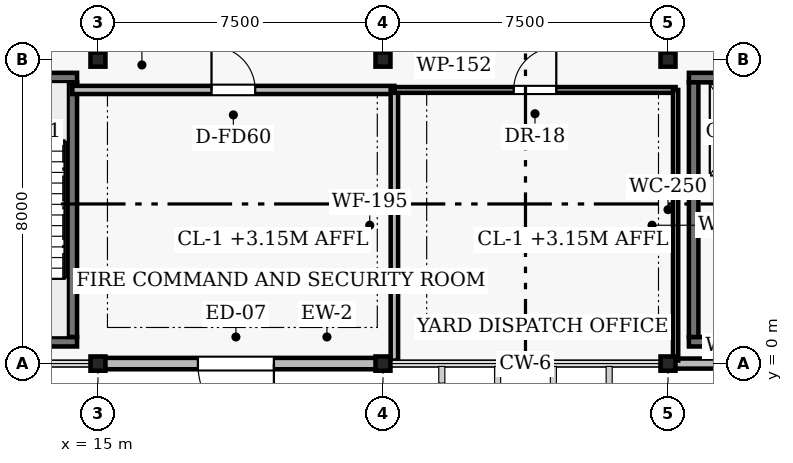
"""IFC4 building model, lengths in metres.
Left out: names, types, materials, properties, quantities, classifications, styles, units other than length and angle.
Written with IfcOpenShell. Run it as: python <this file> out.ifc"""

import sys

from ifc_helpers import new_model, si_unit, direction, frame, frame_2d, origin, origin_2d, place, context, subcontext, project, spatial, rectangle, i_section, extrude, element, fill, save


model = new_model("IFC4")
c1 = context("Model", 3, precision=1e-05, world=origin(), true_north=direction((0.0, 1.0)))
c2 = subcontext(c1, "Body", "Model", "MODEL_VIEW")
j1 = project(units=[si_unit("LENGTHUNIT", "METRE"), si_unit("PLANEANGLEUNIT", "RADIAN")], contexts=[c1])
p1 = place(None, origin())
s1 = spatial("IfcSite", under=j1, at=p1, CompositionType="ELEMENT")
p2 = place(p1, origin())
s2 = spatial("IfcBuilding", under=s1, at=p2, CompositionType="ELEMENT")
p3 = place(p2, origin())
s3 = spatial("IfcBuildingStorey", under=s2, at=p3, CompositionType="ELEMENT", Elevation=0.0)
for number, where, z_axis, x_axis in (
    (1, (15.0, 0.0, 0.0), (0.0, 0.0, 1.0), (1.0, 0.0, 0.0)),
    (2, (15.0, 8.0, 0.0), (0.0, 0.0, 1.0), (1.0, 0.0, 0.0)),
    (3, (22.5, 0.0, 0.0), (0.0, 0.0, 1.0), (1.0, 0.0, 0.0)),
    (4, (22.5, 8.0, 0.0), (0.0, 0.0, 1.0), (1.0, 0.0, 0.0)),
    (5, (30.0, 0.0, 0.0), (0.0, 0.0, 1.0), (1.0, 0.0, 0.0)),
    (6, (30.0, 8.0, 0.0), (0.0, 0.0, 1.0), (1.0, 0.0, 0.0)),
):
    element("IfcColumn", number, at=place(p3, frame(where, z_axis=z_axis, x_axis=x_axis)), inside=s3, PredefinedType="COLUMN", context=c2, shape_type="SweptSolid", body=[
        extrude(i_section(OverallWidth=0.394, OverallDepth=0.375, WebThickness=0.021, FlangeThickness=0.033, FilletRadius=0.018, at=origin_2d()), origin(), (0.0, 0.0, 1.0), 4.5),
    ])
p4 = place(p3, frame((15.08, 0.0, 0.0), z_axis=(0.0, 0.0, 1.0), x_axis=(1.0, 0.0, 0.0)))
e7 = element("IfcWall", 7, at=p4, inside=s3, PredefinedType="SOLIDWALL", context=c2, shape_type="SweptSolid", body=[
    extrude(rectangle(XDim=7.34, YDim=0.3, at=frame_2d((3.67, 0.0))), origin(), (0.0, 0.0, 1.0), 3.75),
])
p5 = place(p4, frame((2.55, 0.0, 0.0)))
e8 = element("IfcOpeningElement", 8, at=p5, cuts=e7, PredefinedType="OPENING", context=c2, shape_type="SweptSolid", body=[
    extrude(rectangle(XDim=2.0, YDim=2.2, at=frame_2d((1.0, 1.1))), frame((0.0, 0.16, 0.0), z_axis=(0.0, -1.0, 0.0), x_axis=(1.0, 0.0, 0.0)), (0.0, 0.0, 1.0), 0.32),
])
p6 = place(p3, frame((30.08, 0.0, 0.0), z_axis=(0.0, 0.0, 1.0), x_axis=(1.0, 0.0, 0.0)))
e9 = element("IfcWall", 9, at=p6, inside=s3, PredefinedType="SOLIDWALL", context=c2, shape_type="SweptSolid", body=[
    extrude(rectangle(XDim=7.34, YDim=0.265, at=frame_2d((3.67, 0.0))), origin(), (0.0, 0.0, 1.0), 3.85),
])
p7 = place(p6, frame((1.2, 0.0, 1.05)))
e10 = element("IfcOpeningElement", 10, at=p7, cuts=e9, PredefinedType="OPENING", context=c2, shape_type="SweptSolid", body=[
    extrude(rectangle(XDim=1.2, YDim=1.5, at=frame_2d((0.6, 0.75))), frame((0.0, 0.142, 0.0), z_axis=(0.0, -1.0, 0.0), x_axis=(1.0, 0.0, 0.0)), (0.0, 0.0, 1.0), 0.285),
])
p8 = place(p6, frame((4.1, 0.0, 1.05)))
e11 = element("IfcOpeningElement", 11, at=p8, cuts=e9, PredefinedType="OPENING", context=c2, shape_type="SweptSolid", body=[
    extrude(rectangle(XDim=1.2, YDim=1.65, at=frame_2d((0.6, 0.825))), frame((0.0, 0.142, 0.0), z_axis=(0.0, -1.0, 0.0), x_axis=(1.0, 0.0, 0.0)), (0.0, 0.0, 1.0), 0.285),
])
p9 = place(p3, frame((8.05, 0.575, 0.0), z_axis=(0.0, 0.0, 1.0), x_axis=(1.0, 0.0, 0.0)))
e12 = element("IfcWall", 12, at=p9, inside=s3, PredefinedType="SHEAR", context=c2, shape_type="SweptSolid", body=[
    extrude(rectangle(XDim=6.4, YDim=0.25, at=frame_2d((3.2, 0.0))), origin(), (0.0, 0.0, 1.0), 4.5),
])
p10 = place(p3, frame((8.05, 7.525, 0.0), z_axis=(0.0, 0.0, 1.0), x_axis=(1.0, 0.0, 0.0)))
e13 = element("IfcWall", 13, at=p10, inside=s3, PredefinedType="SHEAR", context=c2, shape_type="SweptSolid", body=[
    extrude(rectangle(XDim=6.4, YDim=0.25, at=frame_2d((3.2, 0.0))), origin(), (0.0, 0.0, 1.0), 4.5),
])
p11 = place(p10, frame((0.8, 0.0, 0.0)))
e14 = element("IfcOpeningElement", 14, at=p11, cuts=e13, PredefinedType="OPENING", context=c2, shape_type="SweptSolid", body=[
    extrude(rectangle(XDim=1.1, YDim=2.15, at=frame_2d((0.55, 1.075))), frame((0.0, 0.135, 0.0), z_axis=(0.0, -1.0, 0.0), x_axis=(1.0, 0.0, 0.0)), (0.0, 0.0, 1.0), 0.27),
])
p12 = place(p10, frame((3.775, 0.0, 0.0)))
e15 = element("IfcOpeningElement", 15, at=p12, cuts=e13, PredefinedType="OPENING", context=c2, shape_type="SweptSolid", body=[
    extrude(rectangle(XDim=1.25, YDim=2.15, at=frame_2d((0.625, 1.075))), frame((0.0, 0.135, 0.0), z_axis=(0.0, -1.0, 0.0), x_axis=(1.0, 0.0, 0.0)), (0.0, 0.0, 1.0), 0.27),
])
p13 = place(p3, frame((14.325, 0.7, 0.0), z_axis=(0.0, 0.0, 1.0), x_axis=(0.0, 1.0, 0.0)))
e16 = element("IfcWall", 16, at=p13, inside=s3, PredefinedType="SHEAR", context=c2, shape_type="SweptSolid", body=[
    extrude(rectangle(XDim=6.7, YDim=0.25, at=frame_2d((3.35, 0.0))), origin(), (0.0, 0.0, 1.0), 4.5),
])
p14 = place(p3, frame((30.55, 0.575, 0.0), z_axis=(0.0, 0.0, 1.0), x_axis=(1.0, 0.0, 0.0)))
e17 = element("IfcWall", 17, at=p14, inside=s3, PredefinedType="SHEAR", context=c2, shape_type="SweptSolid", body=[
    extrude(rectangle(XDim=6.4, YDim=0.25, at=frame_2d((3.2, 0.0))), origin(), (0.0, 0.0, 1.0), 4.5),
])
p15 = place(p3, frame((30.55, 7.525, 0.0), z_axis=(0.0, 0.0, 1.0), x_axis=(1.0, 0.0, 0.0)))
e18 = element("IfcWall", 18, at=p15, inside=s3, PredefinedType="SHEAR", context=c2, shape_type="SweptSolid", body=[
    extrude(rectangle(XDim=6.4, YDim=0.25, at=frame_2d((3.2, 0.0))), origin(), (0.0, 0.0, 1.0), 4.5),
])
p16 = place(p15, frame((0.8, 0.0, 0.0)))
e19 = element("IfcOpeningElement", 19, at=p16, cuts=e18, PredefinedType="OPENING", context=c2, shape_type="SweptSolid", body=[
    extrude(rectangle(XDim=1.1, YDim=2.15, at=frame_2d((0.55, 1.075))), frame((0.0, 0.135, 0.0), z_axis=(0.0, -1.0, 0.0), x_axis=(1.0, 0.0, 0.0)), (0.0, 0.0, 1.0), 0.27),
])
p17 = place(p15, frame((3.775, 0.0, 0.0)))
e20 = element("IfcOpeningElement", 20, at=p17, cuts=e18, PredefinedType="OPENING", context=c2, shape_type="SweptSolid", body=[
    extrude(rectangle(XDim=1.25, YDim=2.15, at=frame_2d((0.625, 1.075))), frame((0.0, 0.135, 0.0), z_axis=(0.0, -1.0, 0.0), x_axis=(1.0, 0.0, 0.0)), (0.0, 0.0, 1.0), 0.27),
])
p18 = place(p3, frame((30.675, 0.7, 0.0), z_axis=(0.0, 0.0, 1.0), x_axis=(0.0, 1.0, 0.0)))
e21 = element("IfcWall", 21, at=p18, inside=s3, PredefinedType="SHEAR", context=c2, shape_type="SweptSolid", body=[
    extrude(rectangle(XDim=6.7, YDim=0.25, at=frame_2d((3.35, 0.0))), origin(), (0.0, 0.0, 1.0), 4.5),
])
p19 = place(p3, frame((14.325, 7.2, 0.0), z_axis=(0.0, 0.0, 1.0), x_axis=(1.0, 0.0, 0.0)))
e22 = element("IfcWall", 22, at=p19, inside=s3, PredefinedType="PARTITIONING", context=c2, shape_type="SweptSolid", body=[
    extrude(rectangle(XDim=8.475, YDim=0.215, at=frame_2d((4.238, 0.0))), origin(), (0.0, 0.0, 1.0), 3.7),
])
p20 = place(p19, frame((3.663, 0.0, 0.0)))
e23 = element("IfcOpeningElement", 23, at=p20, cuts=e22, PredefinedType="OPENING", context=c2, shape_type="SweptSolid", body=[
    extrude(rectangle(XDim=1.15, YDim=2.15, at=frame_2d((0.575, 1.075))), frame((0.0, 0.117, 0.0), z_axis=(0.0, -1.0, 0.0), x_axis=(1.0, 0.0, 0.0)), (0.0, 0.0, 1.0), 0.235),
])
p21 = place(p3, frame((22.8, 0.08, 0.0), z_axis=(0.0, 0.0, 1.0), x_axis=(0.0, 1.0, 0.0)))
e24 = element("IfcWall", 24, at=p21, inside=s3, PredefinedType="PARTITIONING", context=c2, shape_type="SweptSolid", body=[
    extrude(rectangle(XDim=7.12, YDim=0.195, at=frame_2d((3.56, 0.0))), origin(), (0.0, 0.0, 1.0), 3.7),
])
p22 = place(p3, frame((22.8, 7.2, 0.0), z_axis=(0.0, 0.0, 1.0), x_axis=(1.0, 0.0, 0.0)))
e25 = element("IfcWall", 25, at=p22, inside=s3, PredefinedType="PARTITIONING", context=c2, shape_type="SweptSolid", body=[
    extrude(rectangle(XDim=7.4, YDim=0.152, at=frame_2d((3.7, 0.0))), origin(), (0.0, 0.0, 1.0), 3.7),
])
p23 = place(p22, frame((3.14, 0.0, 0.0)))
e26 = element("IfcOpeningElement", 26, at=p23, cuts=e25, PredefinedType="OPENING", context=c2, shape_type="SweptSolid", body=[
    extrude(rectangle(XDim=1.12, YDim=2.14, at=frame_2d((0.56, 1.07))), frame((0.0, 0.086, 0.0), z_axis=(0.0, -1.0, 0.0), x_axis=(1.0, 0.0, 0.0)), (0.0, 0.0, 1.0), 0.172),
])
p24 = place(p3, frame((30.2, 0.08, 0.0), z_axis=(0.0, 0.0, 1.0), x_axis=(0.0, 1.0, 0.0)))
e27 = element("IfcWall", 27, at=p24, inside=s3, PredefinedType="PARTITIONING", context=c2, shape_type="SweptSolid", body=[
    extrude(rectangle(XDim=7.12, YDim=0.138, at=frame_2d((3.56, 0.0))), origin(), (0.0, 0.0, 1.0), 3.7),
])
p25 = place(p5, frame((2.0, 0.0, 0.0), z_axis=(0.0, 0.0, 1.0), x_axis=(-1.0, 0.0, 0.0)))
e28 = element("IfcDoor", 28, at=p25, inside=s3, OperationType="SINGLE_SWING_LEFT", PredefinedType="DOOR", context=c2, shape_type="SweptSolid", body=[
    extrude(rectangle(XDim=2.0, YDim=2.2, at=frame_2d((1.0, 1.1))), frame((0.0, 0.025, 0.0), z_axis=(0.0, -1.0, 0.0), x_axis=(1.0, 0.0, 0.0)), (0.0, 0.0, 1.0), 0.05),
])
fill(e8, e28)
p26 = place(p20, origin())
e29 = element("IfcDoor", 29, at=p26, inside=s3, OperationType="SINGLE_SWING_LEFT", PredefinedType="DOOR", context=c2, shape_type="SweptSolid", body=[
    extrude(rectangle(XDim=1.15, YDim=2.15, at=frame_2d((0.575, 1.075))), frame((0.0, 0.025, 0.0), z_axis=(0.0, -1.0, 0.0), x_axis=(1.0, 0.0, 0.0)), (0.0, 0.0, 1.0), 0.05),
])
fill(e23, e29)
p27 = place(p23, origin())
e30 = element("IfcDoor", 30, at=p27, inside=s3, OperationType="SINGLE_SWING_RIGHT", PredefinedType="DOOR", context=c2, shape_type="SweptSolid", body=[
    extrude(rectangle(XDim=1.12, YDim=2.14, at=frame_2d((0.56, 1.07))), frame((0.0, 0.025, 0.0), z_axis=(0.0, -1.0, 0.0), x_axis=(1.0, 0.0, 0.0)), (0.0, 0.0, 1.0), 0.05),
])
fill(e26, e30)
save(model, sys.argv[1])
